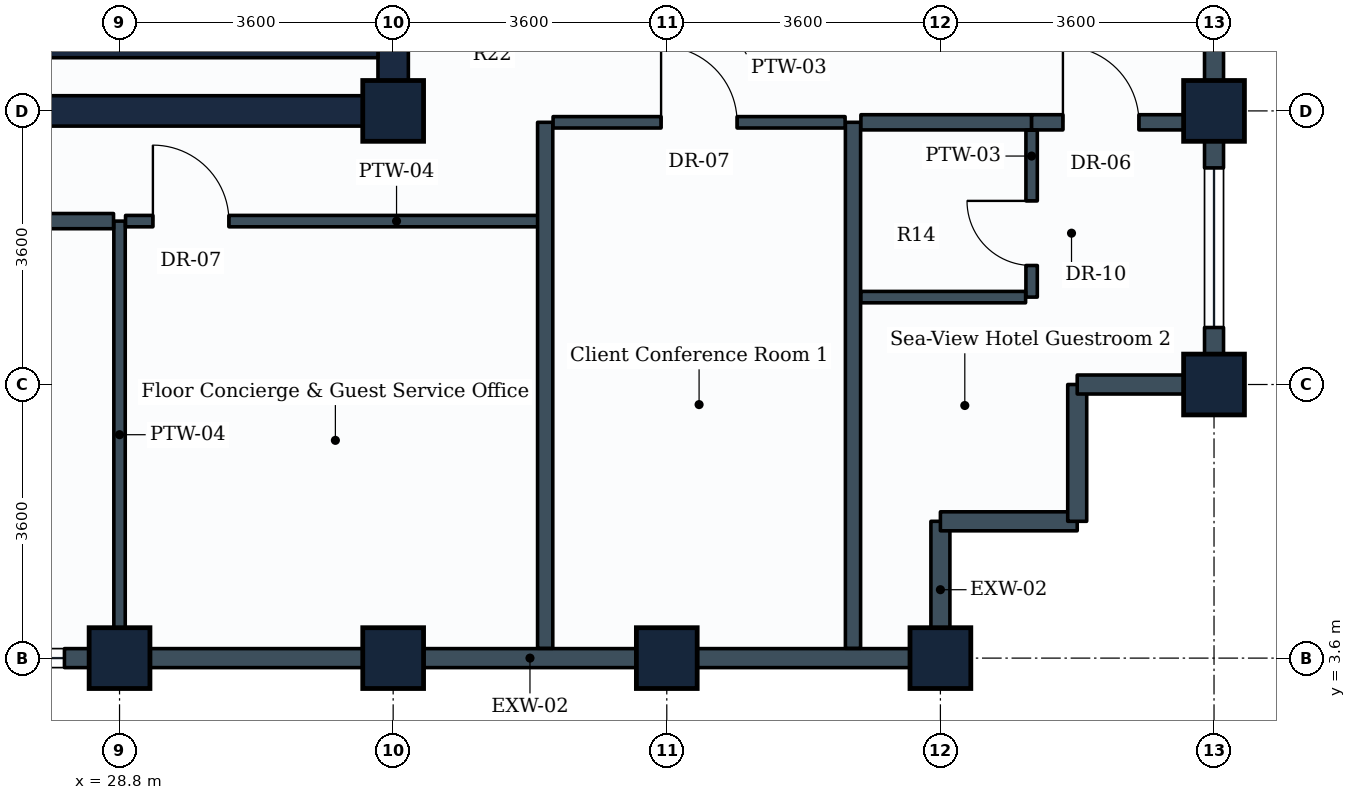
"""IFC4 building model, lengths in metres.
Left out: names, types, materials, properties, quantities, classifications, styles, units other than length and angle.
Written with IfcOpenShell. Run it as: python <this file> out.ifc"""

import sys

from ifc_helpers import new_model, si_unit, direction, frame, frame_2d, origin, origin_2d, place, context, subcontext, project, spatial, rectangle, extrude, element, fill, save


model = new_model("IFC4")
c1 = context("Model", 3, precision=1e-05, world=origin(), true_north=direction((0.0, 1.0)))
c2 = subcontext(c1, "Body", "Model", "MODEL_VIEW")
j1 = project(units=[si_unit("LENGTHUNIT", "METRE"), si_unit("PLANEANGLEUNIT", "RADIAN")], contexts=[c1])
p1 = place(None, origin())
s1 = spatial("IfcSite", under=j1, at=p1, CompositionType="ELEMENT")
p2 = place(p1, origin())
s2 = spatial("IfcBuilding", under=s1, at=p2, CompositionType="ELEMENT")
p3 = place(p2, frame((0.0, 0.0, 255.8)))
s3 = spatial("IfcBuildingStorey", under=s2, at=p3, CompositionType="ELEMENT", Elevation=255.8)
for number, where, z_axis, x_axis in (
    (1, (28.8, 3.6, 0.0), (0.0, 0.0, 1.0), (1.0, 0.0, 0.0)),
    (2, (32.4, 3.6, 0.0), (0.0, 0.0, 1.0), (1.0, 0.0, 0.0)),
    (3, (32.4, 10.8, 0.0), (0.0, 0.0, 1.0), (1.0, 0.0, 0.0)),
    (4, (36.0, 3.6, 0.0), (0.0, 0.0, 1.0), (1.0, 0.0, 0.0)),
    (5, (39.6, 3.6, 0.0), (0.0, 0.0, 1.0), (1.0, 0.0, 0.0)),
    (6, (43.2, 7.2, 0.0), (0.0, 0.0, 1.0), (1.0, 0.0, 0.0)),
    (7, (43.2, 10.8, 0.0), (0.0, 0.0, 1.0), (0.0, 1.0, 0.0)),
):
    element("IfcColumn", number, at=place(p3, frame(where, z_axis=z_axis, x_axis=x_axis)), inside=s3, PredefinedType="COLUMN", context=c2, shape_type="SweptSolid", body=[
        extrude(rectangle(XDim=0.8, YDim=0.8, at=origin_2d()), origin(), (0.0, 0.0, 1.0), 3.6),
    ])
p4 = place(p3, frame((28.8, 3.6, 0.0), z_axis=(0.0, 0.0, 1.0), x_axis=(-1.0, 0.0, 0.0)))
e8 = element("IfcWall", 8, at=p4, inside=s3, PredefinedType="STANDARD", context=c2, shape_type="SweptSolid", body=[
    extrude(rectangle(XDim=3.6, YDim=0.25, at=frame_2d((1.8, 0.0))), origin(), (0.0, 0.0, 1.0), 2.83),
])
p5 = place(p4, frame((0.725, 0.0, 0.85)))
e9 = element("IfcOpeningElement", 9, at=p5, cuts=e8, PredefinedType="OPENING", context=c2, shape_type="SweptSolid", body=[
    extrude(rectangle(XDim=2.1, YDim=1.35, at=frame_2d((1.05, 0.675))), frame((0.0, 0.135, 0.0), z_axis=(0.0, -1.0, 0.0), x_axis=(1.0, 0.0, 0.0)), (0.0, 0.0, 1.0), 0.27),
])
p6 = place(p3, frame((32.4, 3.6, 0.0), z_axis=(0.0, 0.0, 1.0), x_axis=(-1.0, 0.0, 0.0)))
e10 = element("IfcWall", 10, at=p6, inside=s3, PredefinedType="STANDARD", context=c2, shape_type="SweptSolid", body=[
    extrude(rectangle(XDim=3.6, YDim=0.25, at=frame_2d((1.8, 0.0))), origin(), (0.0, 0.0, 1.0), 2.83),
])
for number, where, z_axis, x_axis in (
    (11, (36.0, 3.6, 0.0), (0.0, 0.0, 1.0), (-1.0, 0.0, 0.0)),
    (12, (39.6, 3.6, 0.0), (0.0, 0.0, 1.0), (-1.0, 0.0, 0.0)),
):
    element("IfcWall", number, at=place(p3, frame(where, z_axis=z_axis, x_axis=x_axis)), inside=s3, PredefinedType="STANDARD", context=c2, shape_type="SweptSolid", body=[
        extrude(rectangle(XDim=3.6, YDim=0.25, at=frame_2d((1.8, 0.0))), origin(), (0.0, 0.0, 1.0), 2.83),
    ])
p7 = place(p3, frame((39.6, 5.4, 0.0), z_axis=(0.0, 0.0, 1.0), x_axis=(0.0, -1.0, 0.0)))
e13 = element("IfcWall", 13, at=p7, inside=s3, PredefinedType="STANDARD", context=c2, shape_type="SweptSolid", body=[
    extrude(rectangle(XDim=1.8, YDim=0.25, at=frame_2d((0.9, 0.0))), origin(), (0.0, 0.0, 1.0), 2.83),
])
p8 = place(p3, frame((41.4, 5.4, 0.0), z_axis=(0.0, 0.0, 1.0), x_axis=(-1.0, 0.0, 0.0)))
e14 = element("IfcWall", 14, at=p8, inside=s3, PredefinedType="STANDARD", context=c2, shape_type="SweptSolid", body=[
    extrude(rectangle(XDim=1.8, YDim=0.25, at=frame_2d((0.9, 0.0))), origin(), (0.0, 0.0, 1.0), 3.335),
])
p9 = place(p3, frame((41.4, 7.2, 0.0), z_axis=(0.0, 0.0, 1.0), x_axis=(0.0, -1.0, 0.0)))
e15 = element("IfcWall", 15, at=p9, inside=s3, PredefinedType="STANDARD", context=c2, shape_type="SweptSolid", body=[
    extrude(rectangle(XDim=1.8, YDim=0.25, at=frame_2d((0.9, 0.0))), origin(), (0.0, 0.0, 1.0), 3.335),
])
p10 = place(p3, frame((43.2, 7.2, 0.0), z_axis=(0.0, 0.0, 1.0), x_axis=(-1.0, 0.0, 0.0)))
e16 = element("IfcWall", 16, at=p10, inside=s3, PredefinedType="STANDARD", context=c2, shape_type="SweptSolid", body=[
    extrude(rectangle(XDim=1.8, YDim=0.25, at=frame_2d((0.9, 0.0))), origin(), (0.0, 0.0, 1.0), 2.83),
])
p11 = place(p3, frame((43.2, 10.8, 0.0), z_axis=(0.0, 0.0, 1.0), x_axis=(0.0, -1.0, 0.0)))
e17 = element("IfcWall", 17, at=p11, inside=s3, PredefinedType="STANDARD", context=c2, shape_type="SweptSolid", body=[
    extrude(rectangle(XDim=3.6, YDim=0.25, at=frame_2d((1.8, 0.0))), origin(), (0.0, 0.0, 1.0), 2.83),
])
p12 = place(p11, frame((0.75, 0.0, 0.85)))
e18 = element("IfcOpeningElement", 18, at=p12, cuts=e17, PredefinedType="OPENING", context=c2, shape_type="SweptSolid", body=[
    extrude(rectangle(XDim=2.1, YDim=1.35, at=frame_2d((1.05, 0.675))), frame((0.0, 0.135, 0.0), z_axis=(0.0, -1.0, 0.0), x_axis=(1.0, 0.0, 0.0)), (0.0, 0.0, 1.0), 0.27),
])
p13 = place(p3, frame((43.2, 14.4, 0.0), z_axis=(0.0, 0.0, 1.0), x_axis=(0.0, -1.0, 0.0)))
e19 = element("IfcWall", 19, at=p13, inside=s3, PredefinedType="STANDARD", context=c2, shape_type="SweptSolid", body=[
    extrude(rectangle(XDim=3.6, YDim=0.25, at=frame_2d((1.8, 0.0))), origin(), (0.0, 0.0, 1.0), 2.83),
])
p14 = place(p3, frame((14.4, 10.8, 0.0), z_axis=(0.0, 0.0, 1.0), x_axis=(1.0, 0.0, 0.0)))
e20 = element("IfcWall", 20, at=p14, inside=s3, PredefinedType="SHEAR", context=c2, shape_type="SweptSolid", body=[
    extrude(rectangle(XDim=18.0, YDim=0.4, at=frame_2d((9.0, 0.0))), origin(), (0.0, 0.0, 1.0), 3.35),
])
p15 = place(p3, frame((32.4, 10.8, 0.0), z_axis=(0.0, 0.0, 1.0), x_axis=(0.0, 1.0, 0.0)))
e21 = element("IfcWall", 21, at=p15, inside=s3, PredefinedType="SHEAR", context=c2, shape_type="SweptSolid", body=[
    extrude(rectangle(XDim=14.4, YDim=0.4, at=frame_2d((7.2, 0.0))), origin(), (0.0, 0.0, 1.0), 3.35),
])
p16 = place(p15, frame((4.35, 0.0, 0.0)))
e22 = element("IfcOpeningElement", 22, at=p16, cuts=e21, PredefinedType="OPENING", context=c2, shape_type="SweptSolid", body=[
    extrude(rectangle(XDim=1.2, YDim=2.1, at=frame_2d((0.6, 1.05))), frame((0.0, 0.21, 0.0), z_axis=(0.0, -1.0, 0.0), x_axis=(1.0, 0.0, 0.0)), (0.0, 0.0, 1.0), 0.42),
])
p17 = place(p15, frame((10.0, 0.0, 0.0)))
e23 = element("IfcOpeningElement", 23, at=p17, cuts=e21, PredefinedType="OPENING", context=c2, shape_type="SweptSolid", body=[
    extrude(rectangle(XDim=1.2, YDim=2.1, at=frame_2d((0.6, 1.05))), frame((0.0, 0.21, 0.0), z_axis=(0.0, -1.0, 0.0), x_axis=(1.0, 0.0, 0.0)), (0.0, 0.0, 1.0), 0.42),
])
p18 = place(p3, frame((23.35, 11.625, 0.0), z_axis=(0.0, 0.0, 1.0), x_axis=(1.0, 0.0, 0.0)))
e24 = element("IfcWall", 24, at=p18, inside=s3, PredefinedType="SHEAR", context=c2, shape_type="SweptSolid", body=[
    extrude(rectangle(XDim=8.85, YDim=0.25, at=frame_2d((4.425, 0.0))), origin(), (0.0, 0.0, 1.0), 3.35),
])
p19 = place(p3, frame((28.8, 9.35, 0.0), z_axis=(0.0, 0.0, 1.0), x_axis=(0.0, -1.0, 0.0)))
e25 = element("IfcWall", 25, at=p19, inside=s3, PredefinedType="PARTITIONING", context=c2, shape_type="SweptSolid", body=[
    extrude(rectangle(XDim=5.621, YDim=0.15, at=frame_2d((2.811, 0.0))), origin(), (0.0, 0.0, 1.0), 3.335),
])
p20 = place(p3, frame((12.95, 9.35, 0.0), z_axis=(0.0, 0.0, 1.0), x_axis=(1.0, 0.0, 0.0)))
e26 = element("IfcWall", 26, at=p20, inside=s3, PredefinedType="PARTITIONING", context=c2, shape_type="SweptSolid", body=[
    extrude(rectangle(XDim=15.771, YDim=0.2, at=frame_2d((7.885, 0.0))), origin(), (0.0, 0.0, 1.0), 3.02),
])
p21 = place(p20, frame((4.836, 0.0, 0.0)))
e27 = element("IfcOpeningElement", 27, at=p21, cuts=e26, PredefinedType="OPENING", context=c2, shape_type="SweptSolid", body=[
    extrude(rectangle(XDim=1.0, YDim=2.1, at=frame_2d((0.5, 1.05))), frame((0.0, 0.11, 0.0), z_axis=(0.0, -1.0, 0.0), x_axis=(1.0, 0.0, 0.0)), (0.0, 0.0, 1.0), 0.22),
])
p22 = place(p3, frame((28.879, 9.35, 0.0), z_axis=(0.0, 0.0, 1.0), x_axis=(1.0, 0.0, 0.0)))
e28 = element("IfcWall", 28, at=p22, inside=s3, PredefinedType="PARTITIONING", context=c2, shape_type="SweptSolid", body=[
    extrude(rectangle(XDim=5.521, YDim=0.15, at=frame_2d((2.76, 0.0))), origin(), (0.0, 0.0, 1.0), 3.335),
])
p23 = place(p22, frame((0.36, 0.0, 0.0)))
e29 = element("IfcOpeningElement", 29, at=p23, cuts=e28, PredefinedType="OPENING", context=c2, shape_type="SweptSolid", body=[
    extrude(rectangle(XDim=1.0, YDim=2.1, at=frame_2d((0.5, 1.05))), frame((0.0, 0.085, 0.0), z_axis=(0.0, -1.0, 0.0), x_axis=(1.0, 0.0, 0.0)), (0.0, 0.0, 1.0), 0.17),
])
for number, where, z_axis, x_axis in (
    (30, (34.4, 3.729, 0.0), (0.0, 0.0, 1.0), (0.0, 1.0, 0.0)),
    (31, (38.45, 3.729, 0.0), (0.0, 0.0, 1.0), (0.0, 1.0, 0.0)),
):
    element("IfcWall", number, at=place(p3, frame(where, z_axis=z_axis, x_axis=x_axis)), inside=s3, PredefinedType="PARTITIONING", context=c2, shape_type="SweptSolid", body=[
        extrude(rectangle(XDim=6.921, YDim=0.2, at=frame_2d((3.46, 0.0))), origin(), (0.0, 0.0, 1.0), 2.83),
    ])
p24 = place(p3, frame((34.504, 10.65, 0.0), z_axis=(0.0, 0.0, 1.0), x_axis=(1.0, 0.0, 0.0)))
e32 = element("IfcWall", 32, at=p24, inside=s3, PredefinedType="PARTITIONING", context=c2, shape_type="SweptSolid", body=[
    extrude(rectangle(XDim=3.842, YDim=0.15, at=frame_2d((1.921, 0.0))), origin(), (0.0, 0.0, 1.0), 3.02),
])
p25 = place(p24, frame((1.421, 0.0, 0.0)))
e33 = element("IfcOpeningElement", 33, at=p25, cuts=e32, PredefinedType="OPENING", context=c2, shape_type="SweptSolid", body=[
    extrude(rectangle(XDim=1.0, YDim=2.1, at=frame_2d((0.5, 1.05))), frame((0.0, 0.085, 0.0), z_axis=(0.0, -1.0, 0.0), x_axis=(1.0, 0.0, 0.0)), (0.0, 0.0, 1.0), 0.17),
])
p26 = place(p3, frame((38.554, 10.65, 0.0), z_axis=(0.0, 0.0, 1.0), x_axis=(1.0, 0.0, 0.0)))
e34 = element("IfcWall", 34, at=p26, inside=s3, PredefinedType="PARTITIONING", context=c2, shape_type="SweptSolid", body=[
    extrude(rectangle(XDim=2.246, YDim=0.2, at=frame_2d((1.123, 0.0))), origin(), (0.0, 0.0, 1.0), 3.335),
])
p27 = place(p3, frame((40.8, 10.65, 0.0), z_axis=(0.0, 0.0, 1.0), x_axis=(1.0, 0.0, 0.0)))
e35 = element("IfcWall", 35, at=p27, inside=s3, PredefinedType="PARTITIONING", context=c2, shape_type="SweptSolid", body=[
    extrude(rectangle(XDim=2.271, YDim=0.2, at=frame_2d((1.135, 0.0))), origin(), (0.0, 0.0, 1.0), 2.83),
])
p28 = place(p27, frame((0.412, 0.0, 0.0)))
e36 = element("IfcOpeningElement", 36, at=p28, cuts=e35, PredefinedType="OPENING", context=c2, shape_type="SweptSolid", body=[
    extrude(rectangle(XDim=1.0, YDim=2.1, at=frame_2d((0.5, 1.05))), frame((0.0, 0.11, 0.0), z_axis=(0.0, -1.0, 0.0), x_axis=(1.0, 0.0, 0.0)), (0.0, 0.0, 1.0), 0.22),
])
p29 = place(p3, frame((40.8, 8.35, 0.0), z_axis=(0.0, 0.0, 1.0), x_axis=(0.0, 1.0, 0.0)))
e37 = element("IfcWall", 37, at=p29, inside=s3, PredefinedType="PARTITIONING", context=c2, shape_type="SweptSolid", body=[
    extrude(rectangle(XDim=2.196, YDim=0.15, at=frame_2d((1.098, 0.0))), origin(), (0.0, 0.0, 1.0), 3.335),
])
p30 = place(p29, frame((0.416, 0.0, 0.0)))
e38 = element("IfcOpeningElement", 38, at=p30, cuts=e37, PredefinedType="OPENING", context=c2, shape_type="SweptSolid", body=[
    extrude(rectangle(XDim=0.85, YDim=2.1, at=frame_2d((0.425, 1.05))), frame((0.0, 0.085, 0.0), z_axis=(0.0, -1.0, 0.0), x_axis=(1.0, 0.0, 0.0)), (0.0, 0.0, 1.0), 0.17),
])
p31 = place(p3, frame((38.554, 8.35, 0.0), z_axis=(0.0, 0.0, 1.0), x_axis=(1.0, 0.0, 0.0)))
e39 = element("IfcWall", 39, at=p31, inside=s3, PredefinedType="PARTITIONING", context=c2, shape_type="SweptSolid", body=[
    extrude(rectangle(XDim=2.167, YDim=0.15, at=frame_2d((1.083, 0.0))), origin(), (0.0, 0.0, 1.0), 3.335),
])
p32 = place(p5, origin())
e40 = element("IfcWindow", 40, at=p32, inside=s3, PartitioningType="SINGLE_PANEL", PredefinedType="WINDOW", context=c2, shape_type="SweptSolid", body=[
    extrude(rectangle(XDim=2.1, YDim=1.35, at=frame_2d((1.05, 0.675))), frame((0.0, 0.03, 0.0), z_axis=(0.0, -1.0, 0.0), x_axis=(1.0, 0.0, 0.0)), (0.0, 0.0, 1.0), 0.06),
])
fill(e9, e40)
p33 = place(p12, origin())
e41 = element("IfcWindow", 41, at=p33, inside=s3, PartitioningType="SINGLE_PANEL", PredefinedType="WINDOW", context=c2, shape_type="SweptSolid", body=[
    extrude(rectangle(XDim=2.1, YDim=1.35, at=frame_2d((1.05, 0.675))), frame((0.0, 0.03, 0.0), z_axis=(0.0, -1.0, 0.0), x_axis=(1.0, 0.0, 0.0)), (0.0, 0.0, 1.0), 0.06),
])
fill(e18, e41)
p34 = place(p23, origin())
e42 = element("IfcDoor", 42, at=p34, inside=s3, OperationType="SINGLE_SWING_LEFT", PredefinedType="DOOR", context=c2, shape_type="SweptSolid", body=[
    extrude(rectangle(XDim=1.0, YDim=2.1, at=frame_2d((0.5, 1.05))), frame((0.0, 0.025, 0.0), z_axis=(0.0, -1.0, 0.0), x_axis=(1.0, 0.0, 0.0)), (0.0, 0.0, 1.0), 0.05),
])
fill(e29, e42)
p35 = place(p25, origin())
e43 = element("IfcDoor", 43, at=p35, inside=s3, OperationType="SINGLE_SWING_LEFT", PredefinedType="DOOR", context=c2, shape_type="SweptSolid", body=[
    extrude(rectangle(XDim=1.0, YDim=2.1, at=frame_2d((0.5, 1.05))), frame((0.0, 0.025, 0.0), z_axis=(0.0, -1.0, 0.0), x_axis=(1.0, 0.0, 0.0)), (0.0, 0.0, 1.0), 0.05),
])
fill(e33, e43)
p36 = place(p28, origin())
e44 = element("IfcDoor", 44, at=p36, inside=s3, OperationType="SINGLE_SWING_LEFT", PredefinedType="DOOR", context=c2, shape_type="SweptSolid", body=[
    extrude(rectangle(XDim=1.0, YDim=2.1, at=frame_2d((0.5, 1.05))), frame((0.0, 0.025, 0.0), z_axis=(0.0, -1.0, 0.0), x_axis=(1.0, 0.0, 0.0)), (0.0, 0.0, 1.0), 0.05),
])
fill(e36, e44)
p37 = place(p30, origin())
e45 = element("IfcDoor", 45, at=p37, inside=s3, OperationType="SINGLE_SWING_RIGHT", PredefinedType="DOOR", context=c2, shape_type="SweptSolid", body=[
    extrude(rectangle(XDim=0.85, YDim=2.1, at=frame_2d((0.425, 1.05))), frame((0.0, 0.025, 0.0), z_axis=(0.0, -1.0, 0.0), x_axis=(1.0, 0.0, 0.0)), (0.0, 0.0, 1.0), 0.05),
])
fill(e38, e45)
save(model, sys.argv[1])
